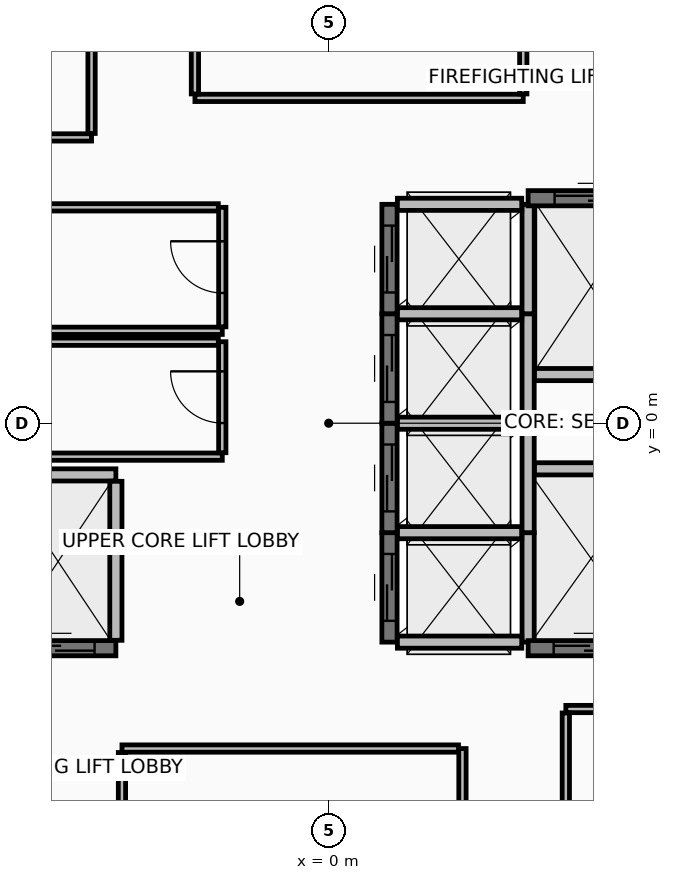
"""IFC4 building model, lengths in metres.
Left out: names, types, materials, properties, quantities, classifications, styles, units other than length and angle.
Written with IfcOpenShell. Run it as: python <this file> out.ifc"""

import sys

from ifc_helpers import new_model, si_unit, direction, frame, frame_2d, origin, place, context, subcontext, project, spatial, rectangle, extrude, element, fill, save


model = new_model("IFC4")
c1 = context("Model", 3, precision=1e-05, world=origin(), true_north=direction((0.0, 1.0)))
c2 = subcontext(c1, "Body", "Model", "MODEL_VIEW")
j1 = project(units=[si_unit("LENGTHUNIT", "METRE"), si_unit("PLANEANGLEUNIT", "RADIAN")], contexts=[c1])
p1 = place(None, origin())
s1 = spatial("IfcSite", under=j1, at=p1, CompositionType="ELEMENT")
p2 = place(p1, origin())
s2 = spatial("IfcBuilding", under=s1, at=p2, CompositionType="ELEMENT")
p3 = place(p2, frame((0.0, 0.0, 283.4)))
s3 = spatial("IfcBuildingStorey", under=s2, at=p3, CompositionType="ELEMENT", Elevation=283.4)
p4 = place(p3, frame((1.0, -3.6, 0.0), z_axis=(0.0, 0.0, 1.0), x_axis=(0.0, 1.0, 0.0)))
e1 = element("IfcWall", 1, at=p4, inside=s3, PredefinedType="SHEAR", context=c2, shape_type="SweptSolid", body=[
    extrude(rectangle(XDim=1.8, YDim=0.25, at=frame_2d((0.9, 0.0))), origin(), (0.0, 0.0, 1.0), 3.465),
])
p5 = place(p4, frame((0.35, 0.0, 0.0)))
e2 = element("IfcOpeningElement", 2, at=p5, cuts=e1, PredefinedType="OPENING", context=c2, shape_type="SweptSolid", body=[
    extrude(rectangle(XDim=1.1, YDim=2.2, at=frame_2d((0.55, 1.1))), frame((0.0, 0.135, 0.0), z_axis=(0.0, -1.0, 0.0), x_axis=(1.0, 0.0, 0.0)), (0.0, 0.0, 1.0), 0.27),
])
p6 = place(p3, frame((3.28, -3.6, 0.0), z_axis=(0.0, 0.0, 1.0), x_axis=(0.0, 1.0, 0.0)))
e3 = element("IfcWall", 3, at=p6, inside=s3, PredefinedType="PARTITIONING", context=c2, shape_type="SweptSolid", body=[
    extrude(rectangle(XDim=1.8, YDim=0.2, at=frame_2d((0.9, 0.0))), origin(), (0.0, 0.0, 1.0), 3.465),
])
for number, where, z_axis, x_axis in (
    (4, (1.13, -3.6, 0.0), (0.0, 0.0, 1.0), (1.0, 0.0, 0.0)),
    (5, (1.13, -1.8, 0.0), (0.0, 0.0, 1.0), (1.0, 0.0, 0.0)),
):
    element("IfcWall", number, at=place(p3, frame(where, z_axis=z_axis, x_axis=x_axis)), inside=s3, PredefinedType="PARTITIONING", context=c2, shape_type="SweptSolid", body=[
        extrude(rectangle(XDim=2.045, YDim=0.2, at=frame_2d((1.022, 0.0))), origin(), (0.0, 0.0, 1.0), 3.465),
    ])
p7 = place(p3, frame((1.0, -1.8, 0.0), z_axis=(0.0, 0.0, 1.0), x_axis=(0.0, 1.0, 0.0)))
e6 = element("IfcWall", 6, at=p7, inside=s3, PredefinedType="SHEAR", context=c2, shape_type="SweptSolid", body=[
    extrude(rectangle(XDim=1.8, YDim=0.25, at=frame_2d((0.9, 0.0))), origin(), (0.0, 0.0, 1.0), 3.465),
])
p8 = place(p7, frame((0.35, 0.0, 0.0)))
e7 = element("IfcOpeningElement", 7, at=p8, cuts=e6, PredefinedType="OPENING", context=c2, shape_type="SweptSolid", body=[
    extrude(rectangle(XDim=1.1, YDim=2.2, at=frame_2d((0.55, 1.1))), frame((0.0, 0.135, 0.0), z_axis=(0.0, -1.0, 0.0), x_axis=(1.0, 0.0, 0.0)), (0.0, 0.0, 1.0), 0.27),
])
p9 = place(p3, frame((3.28, -1.8, 0.0), z_axis=(0.0, 0.0, 1.0), x_axis=(0.0, 1.0, 0.0)))
e8 = element("IfcWall", 8, at=p9, inside=s3, PredefinedType="PARTITIONING", context=c2, shape_type="SweptSolid", body=[
    extrude(rectangle(XDim=1.8, YDim=0.2, at=frame_2d((0.9, 0.0))), origin(), (0.0, 0.0, 1.0), 3.465),
])
p10 = place(p3, frame((1.13, 0.0, 0.0), z_axis=(0.0, 0.0, 1.0), x_axis=(1.0, 0.0, 0.0)))
e9 = element("IfcWall", 9, at=p10, inside=s3, PredefinedType="PARTITIONING", context=c2, shape_type="SweptSolid", body=[
    extrude(rectangle(XDim=2.045, YDim=0.2, at=frame_2d((1.022, 0.0))), origin(), (0.0, 0.0, 1.0), 3.465),
])
p11 = place(p3, frame((1.0, 0.0, 0.0), z_axis=(0.0, 0.0, 1.0), x_axis=(0.0, 1.0, 0.0)))
e10 = element("IfcWall", 10, at=p11, inside=s3, PredefinedType="SHEAR", context=c2, shape_type="SweptSolid", body=[
    extrude(rectangle(XDim=1.8, YDim=0.25, at=frame_2d((0.9, 0.0))), origin(), (0.0, 0.0, 1.0), 3.465),
])
p12 = place(p11, frame((0.35, 0.0, 0.0)))
e11 = element("IfcOpeningElement", 11, at=p12, cuts=e10, PredefinedType="OPENING", context=c2, shape_type="SweptSolid", body=[
    extrude(rectangle(XDim=1.1, YDim=2.2, at=frame_2d((0.55, 1.1))), frame((0.0, 0.135, 0.0), z_axis=(0.0, -1.0, 0.0), x_axis=(1.0, 0.0, 0.0)), (0.0, 0.0, 1.0), 0.27),
])
p13 = place(p3, frame((3.28, 0.0, 0.0), z_axis=(0.0, 0.0, 1.0), x_axis=(0.0, 1.0, 0.0)))
e12 = element("IfcWall", 12, at=p13, inside=s3, PredefinedType="PARTITIONING", context=c2, shape_type="SweptSolid", body=[
    extrude(rectangle(XDim=1.8, YDim=0.2, at=frame_2d((0.9, 0.0))), origin(), (0.0, 0.0, 1.0), 3.465),
])
p14 = place(p3, frame((1.13, 1.8, 0.0), z_axis=(0.0, 0.0, 1.0), x_axis=(1.0, 0.0, 0.0)))
e13 = element("IfcWall", 13, at=p14, inside=s3, PredefinedType="PARTITIONING", context=c2, shape_type="SweptSolid", body=[
    extrude(rectangle(XDim=2.045, YDim=0.2, at=frame_2d((1.022, 0.0))), origin(), (0.0, 0.0, 1.0), 3.465),
])
p15 = place(p3, frame((1.0, 1.8, 0.0), z_axis=(0.0, 0.0, 1.0), x_axis=(0.0, 1.0, 0.0)))
e14 = element("IfcWall", 14, at=p15, inside=s3, PredefinedType="SHEAR", context=c2, shape_type="SweptSolid", body=[
    extrude(rectangle(XDim=1.8, YDim=0.25, at=frame_2d((0.9, 0.0))), origin(), (0.0, 0.0, 1.0), 3.465),
])
p16 = place(p15, frame((0.35, 0.0, 0.0)))
e15 = element("IfcOpeningElement", 15, at=p16, cuts=e14, PredefinedType="OPENING", context=c2, shape_type="SweptSolid", body=[
    extrude(rectangle(XDim=1.1, YDim=2.2, at=frame_2d((0.55, 1.1))), frame((0.0, 0.135, 0.0), z_axis=(0.0, -1.0, 0.0), x_axis=(1.0, 0.0, 0.0)), (0.0, 0.0, 1.0), 0.27),
])
p17 = place(p3, frame((3.28, 1.8, 0.0), z_axis=(0.0, 0.0, 1.0), x_axis=(0.0, 1.0, 0.0)))
e16 = element("IfcWall", 16, at=p17, inside=s3, PredefinedType="PARTITIONING", context=c2, shape_type="SweptSolid", body=[
    extrude(rectangle(XDim=1.8, YDim=0.2, at=frame_2d((0.9, 0.0))), origin(), (0.0, 0.0, 1.0), 3.465),
])
p18 = place(p3, frame((1.13, 3.6, 0.0), z_axis=(0.0, 0.0, 1.0), x_axis=(1.0, 0.0, 0.0)))
e17 = element("IfcWall", 17, at=p18, inside=s3, PredefinedType="PARTITIONING", context=c2, shape_type="SweptSolid", body=[
    extrude(rectangle(XDim=2.045, YDim=0.2, at=frame_2d((1.022, 0.0))), origin(), (0.0, 0.0, 1.0), 2.76),
])
p19 = place(p3, frame((-5.4, -3.7, 0.0), z_axis=(0.0, 0.0, 1.0), x_axis=(1.0, 0.0, 0.0)))
e18 = element("IfcWall", 18, at=p19, inside=s3, PredefinedType="SHEAR", context=c2, shape_type="SweptSolid", body=[
    extrude(rectangle(XDim=1.9, YDim=0.25, at=frame_2d((0.95, 0.0))), origin(), (0.0, 0.0, 1.0), 3.465),
])
p20 = place(p19, frame((0.35, 0.0, 0.0)))
e19 = element("IfcOpeningElement", 19, at=p20, cuts=e18, PredefinedType="OPENING", context=c2, shape_type="SweptSolid", body=[
    extrude(rectangle(XDim=1.2, YDim=2.2, at=frame_2d((0.6, 1.1))), frame((0.0, 0.135, 0.0), z_axis=(0.0, -1.0, 0.0), x_axis=(1.0, 0.0, 0.0)), (0.0, 0.0, 1.0), 0.27),
])
p21 = place(p3, frame((-5.27, -0.85, 0.0), z_axis=(0.0, 0.0, 1.0), x_axis=(1.0, 0.0, 0.0)))
e20 = element("IfcWall", 20, at=p21, inside=s3, PredefinedType="PARTITIONING", context=c2, shape_type="SweptSolid", body=[
    extrude(rectangle(XDim=1.77, YDim=0.2, at=frame_2d((0.885, 0.0))), origin(), (0.0, 0.0, 1.0), 3.465),
])
p22 = place(p3, frame((-3.5, -3.57, 0.0), z_axis=(0.0, 0.0, 1.0), x_axis=(0.0, 1.0, 0.0)))
e21 = element("IfcWall", 21, at=p22, inside=s3, PredefinedType="PARTITIONING", context=c2, shape_type="SweptSolid", body=[
    extrude(rectangle(XDim=2.615, YDim=0.2, at=frame_2d((1.308, 0.0))), origin(), (0.0, 0.0, 1.0), 3.465),
])
p23 = place(p3, frame((3.28, 3.7, 0.0), z_axis=(0.0, 0.0, 1.0), x_axis=(1.0, 0.0, 0.0)))
e22 = element("IfcWall", 22, at=p23, inside=s3, PredefinedType="SHEAR", context=c2, shape_type="SweptSolid", body=[
    extrude(rectangle(XDim=2.07, YDim=0.25, at=frame_2d((1.035, 0.0))), origin(), (0.0, 0.0, 1.0), 3.465),
])
p24 = place(p23, frame((0.435, 0.0, 0.0)))
e23 = element("IfcOpeningElement", 23, at=p24, cuts=e22, PredefinedType="OPENING", context=c2, shape_type="SweptSolid", body=[
    extrude(rectangle(XDim=1.2, YDim=2.2, at=frame_2d((0.6, 1.1))), frame((0.0, 0.135, 0.0), z_axis=(0.0, -1.0, 0.0), x_axis=(1.0, 0.0, 0.0)), (0.0, 0.0, 1.0), 0.27),
])
p25 = place(p3, frame((3.385, 0.8, 0.0), z_axis=(0.0, 0.0, 1.0), x_axis=(1.0, 0.0, 0.0)))
e24 = element("IfcWall", 24, at=p25, inside=s3, PredefinedType="PARTITIONING", context=c2, shape_type="SweptSolid", body=[
    extrude(rectangle(XDim=1.835, YDim=0.2, at=frame_2d((0.917, 0.0))), origin(), (0.0, 0.0, 1.0), 3.465),
])
p26 = place(p3, frame((3.28, -3.7, 0.0), z_axis=(0.0, 0.0, 1.0), x_axis=(1.0, 0.0, 0.0)))
e25 = element("IfcWall", 25, at=p26, inside=s3, PredefinedType="SHEAR", context=c2, shape_type="SweptSolid", body=[
    extrude(rectangle(XDim=1.94, YDim=0.25, at=frame_2d((0.97, 0.0))), origin(), (0.0, 0.0, 1.0), 3.465),
])
p27 = place(p26, frame((0.42, 0.0, 0.0)))
e26 = element("IfcOpeningElement", 26, at=p27, cuts=e25, PredefinedType="OPENING", context=c2, shape_type="SweptSolid", body=[
    extrude(rectangle(XDim=1.1, YDim=2.2, at=frame_2d((0.55, 1.1))), frame((0.0, 0.135, 0.0), z_axis=(0.0, -1.0, 0.0), x_axis=(1.0, 0.0, 0.0)), (0.0, 0.0, 1.0), 0.27),
])
p28 = place(p3, frame((3.385, -0.75, 0.0), z_axis=(0.0, 0.0, 1.0), x_axis=(1.0, 0.0, 0.0)))
e27 = element("IfcWall", 27, at=p28, inside=s3, PredefinedType="PARTITIONING", context=c2, shape_type="SweptSolid", body=[
    extrude(rectangle(XDim=1.835, YDim=0.2, at=frame_2d((0.917, 0.0))), origin(), (0.0, 0.0, 1.0), 3.465),
])
p29 = place(p3, frame((-5.22, 1.52, 0.0), z_axis=(0.0, 0.0, 1.0), x_axis=(1.0, 0.0, 0.0)))
e28 = element("IfcWall", 28, at=p29, inside=s3, PredefinedType="PARTITIONING", context=c2, shape_type="SweptSolid", body=[
    extrude(rectangle(XDim=3.47, YDim=0.12, at=frame_2d((1.735, 0.0))), origin(), (0.0, 0.0, 1.0), 3.465),
])
p30 = place(p3, frame((-1.75, 1.585, 0.0), z_axis=(0.0, 0.0, 1.0), x_axis=(0.0, 1.0, 0.0)))
e29 = element("IfcWall", 29, at=p30, inside=s3, PredefinedType="PARTITIONING", context=c2, shape_type="SweptSolid", body=[
    extrude(rectangle(XDim=1.965, YDim=0.12, at=frame_2d((0.982, 0.0))), origin(), (0.0, 0.0, 1.0), 3.465),
])
p31 = place(p30, frame((0.557, 0.0, 0.0)))
e30 = element("IfcOpeningElement", 30, at=p31, cuts=e29, PredefinedType="OPENING", context=c2, shape_type="SweptSolid", body=[
    extrude(rectangle(XDim=0.85, YDim=2.1, at=frame_2d((0.425, 1.05))), frame((0.0, 0.07, 0.0), z_axis=(0.0, -1.0, 0.0), x_axis=(1.0, 0.0, 0.0)), (0.0, 0.0, 1.0), 0.14),
])
p32 = place(p3, frame((-1.815, 3.55, 0.0), z_axis=(0.0, 0.0, 1.0), x_axis=(-1.0, 0.0, 0.0)))
e31 = element("IfcWall", 31, at=p32, inside=s3, PredefinedType="PARTITIONING", context=c2, shape_type="SweptSolid", body=[
    extrude(rectangle(XDim=3.405, YDim=0.12, at=frame_2d((1.703, 0.0))), origin(), (0.0, 0.0, 1.0), 3.465),
])
p33 = place(p3, frame((-5.22, -0.55, 0.0), z_axis=(0.0, 0.0, 1.0), x_axis=(1.0, 0.0, 0.0)))
e32 = element("IfcWall", 32, at=p33, inside=s3, PredefinedType="PARTITIONING", context=c2, shape_type="SweptSolid", body=[
    extrude(rectangle(XDim=3.47, YDim=0.12, at=frame_2d((1.735, 0.0))), origin(), (0.0, 0.0, 1.0), 3.465),
])
p34 = place(p3, frame((-1.75, -0.485, 0.0), z_axis=(0.0, 0.0, 1.0), x_axis=(0.0, 1.0, 0.0)))
e33 = element("IfcWall", 33, at=p34, inside=s3, PredefinedType="PARTITIONING", context=c2, shape_type="SweptSolid", body=[
    extrude(rectangle(XDim=1.825, YDim=0.12, at=frame_2d((0.913, 0.0))), origin(), (0.0, 0.0, 1.0), 3.465),
])
p35 = place(p34, frame((0.488, 0.0, 0.0)))
e34 = element("IfcOpeningElement", 34, at=p35, cuts=e33, PredefinedType="OPENING", context=c2, shape_type="SweptSolid", body=[
    extrude(rectangle(XDim=0.85, YDim=2.1, at=frame_2d((0.425, 1.05))), frame((0.0, 0.07, 0.0), z_axis=(0.0, -1.0, 0.0), x_axis=(1.0, 0.0, 0.0)), (0.0, 0.0, 1.0), 0.14),
])
p36 = place(p3, frame((-1.815, 1.34, 0.0), z_axis=(0.0, 0.0, 1.0), x_axis=(-1.0, 0.0, 0.0)))
e35 = element("IfcWall", 35, at=p36, inside=s3, PredefinedType="PARTITIONING", context=c2, shape_type="SweptSolid", body=[
    extrude(rectangle(XDim=3.405, YDim=0.12, at=frame_2d((1.703, 0.0))), origin(), (0.0, 0.0, 1.0), 3.465),
])
p37 = place(p3, frame((2.2, -7.42, 0.0), z_axis=(0.0, 0.0, 1.0), x_axis=(0.0, 1.0, 0.0)))
e36 = element("IfcWall", 36, at=p37, inside=s3, PredefinedType="PARTITIONING", context=c2, shape_type="SweptSolid", body=[
    extrude(rectangle(XDim=2.07, YDim=0.12, at=frame_2d((1.035, 0.0))), origin(), (0.0, 0.0, 1.0), 2.76),
])
p38 = place(p3, frame((2.135, -5.35, 0.0), z_axis=(0.0, 0.0, 1.0), x_axis=(-1.0, 0.0, 0.0)))
e37 = element("IfcWall", 37, at=p38, inside=s3, PredefinedType="PARTITIONING", context=c2, shape_type="SweptSolid", body=[
    extrude(rectangle(XDim=5.535, YDim=0.12, at=frame_2d((2.768, 0.0))), origin(), (0.0, 0.0, 1.0), 2.76),
])
p39 = place(p3, frame((-3.4, -5.415, 0.0), z_axis=(0.0, 0.0, 1.0), x_axis=(0.0, -1.0, 0.0)))
e38 = element("IfcWall", 38, at=p39, inside=s3, PredefinedType="PARTITIONING", context=c2, shape_type="SweptSolid", body=[
    extrude(rectangle(XDim=2.8, YDim=0.12, at=frame_2d((1.4, 0.0))), origin(), (0.0, 0.0, 1.0), 2.76),
])
p40 = place(p3, frame((-2.2, 5.35, 0.0), z_axis=(0.0, 0.0, 1.0), x_axis=(1.0, 0.0, 0.0)))
e39 = element("IfcWall", 39, at=p40, inside=s3, PredefinedType="PARTITIONING", context=c2, shape_type="SweptSolid", body=[
    extrude(rectangle(XDim=5.4, YDim=0.12, at=frame_2d((2.7, 0.0))), origin(), (0.0, 0.0, 1.0), 2.76),
])
p41 = place(p3, frame((3.2, 5.415, 0.0), z_axis=(0.0, 0.0, 1.0), x_axis=(0.0, 1.0, 0.0)))
e40 = element("IfcWall", 40, at=p41, inside=s3, PredefinedType="PARTITIONING", context=c2, shape_type="SweptSolid", body=[
    extrude(rectangle(XDim=2.8, YDim=0.12, at=frame_2d((1.4, 0.0))), origin(), (0.0, 0.0, 1.0), 2.76),
])
p42 = place(p3, frame((-2.2, 7.42, 0.0), z_axis=(0.0, 0.0, 1.0), x_axis=(0.0, -1.0, 0.0)))
e41 = element("IfcWall", 41, at=p42, inside=s3, PredefinedType="PARTITIONING", context=c2, shape_type="SweptSolid", body=[
    extrude(rectangle(XDim=2.005, YDim=0.12, at=frame_2d((1.002, 0.0))), origin(), (0.0, 0.0, 1.0), 2.76),
])
p43 = place(p3, frame((-5.35, 4.7, 0.0), z_axis=(0.0, 0.0, 1.0), x_axis=(1.0, 0.0, 0.0)))
e42 = element("IfcWall", 42, at=p43, inside=s3, PredefinedType="PARTITIONING", context=c2, shape_type="SweptSolid", body=[
    extrude(rectangle(XDim=1.45, YDim=0.12, at=frame_2d((0.725, 0.0))), origin(), (0.0, 0.0, 1.0), 3.465),
])
p44 = place(p3, frame((-3.9, 4.765, 0.0), z_axis=(0.0, 0.0, 1.0), x_axis=(0.0, 1.0, 0.0)))
e43 = element("IfcWall", 43, at=p44, inside=s3, PredefinedType="PARTITIONING", context=c2, shape_type="SweptSolid", body=[
    extrude(rectangle(XDim=3.45, YDim=0.12, at=frame_2d((1.725, 0.0))), origin(), (0.0, 0.0, 1.0), 2.76),
])
p45 = place(p3, frame((5.785, -4.7, 0.0), z_axis=(0.0, 0.0, 1.0), x_axis=(-1.0, 0.0, 0.0)))
e44 = element("IfcWall", 44, at=p45, inside=s3, PredefinedType="PARTITIONING", context=c2, shape_type="SweptSolid", body=[
    extrude(rectangle(XDim=1.885, YDim=0.12, at=frame_2d((0.942, 0.0))), origin(), (0.0, 0.0, 1.0), 3.465),
])
p46 = place(p3, frame((3.9, -4.765, 0.0), z_axis=(0.0, 0.0, 1.0), x_axis=(0.0, -1.0, 0.0)))
e45 = element("IfcWall", 45, at=p46, inside=s3, PredefinedType="PARTITIONING", context=c2, shape_type="SweptSolid", body=[
    extrude(rectangle(XDim=3.45, YDim=0.12, at=frame_2d((1.725, 0.0))), origin(), (0.0, 0.0, 1.0), 2.76),
])
p47 = place(p5, origin())
e46 = element("IfcDoor", 46, at=p47, inside=s3, OperationType="SLIDING_TO_LEFT", PredefinedType="DOOR", context=c2, shape_type="SweptSolid", body=[
    extrude(rectangle(XDim=1.1, YDim=2.2, at=frame_2d((0.55, 1.1))), frame((0.0, 0.025, 0.0), z_axis=(0.0, -1.0, 0.0), x_axis=(1.0, 0.0, 0.0)), (0.0, 0.0, 1.0), 0.05),
])
fill(e2, e46)
p48 = place(p8, origin())
e47 = element("IfcDoor", 47, at=p48, inside=s3, OperationType="SLIDING_TO_LEFT", PredefinedType="DOOR", context=c2, shape_type="SweptSolid", body=[
    extrude(rectangle(XDim=1.1, YDim=2.2, at=frame_2d((0.55, 1.1))), frame((0.0, 0.025, 0.0), z_axis=(0.0, -1.0, 0.0), x_axis=(1.0, 0.0, 0.0)), (0.0, 0.0, 1.0), 0.05),
])
fill(e7, e47)
p49 = place(p12, origin())
e48 = element("IfcDoor", 48, at=p49, inside=s3, OperationType="SLIDING_TO_LEFT", PredefinedType="DOOR", context=c2, shape_type="SweptSolid", body=[
    extrude(rectangle(XDim=1.1, YDim=2.2, at=frame_2d((0.55, 1.1))), frame((0.0, 0.025, 0.0), z_axis=(0.0, -1.0, 0.0), x_axis=(1.0, 0.0, 0.0)), (0.0, 0.0, 1.0), 0.05),
])
fill(e11, e48)
p50 = place(p16, origin())
e49 = element("IfcDoor", 49, at=p50, inside=s3, OperationType="SLIDING_TO_LEFT", PredefinedType="DOOR", context=c2, shape_type="SweptSolid", body=[
    extrude(rectangle(XDim=1.1, YDim=2.2, at=frame_2d((0.55, 1.1))), frame((0.0, 0.025, 0.0), z_axis=(0.0, -1.0, 0.0), x_axis=(1.0, 0.0, 0.0)), (0.0, 0.0, 1.0), 0.05),
])
fill(e15, e49)
p51 = place(p20, origin())
e50 = element("IfcDoor", 50, at=p51, inside=s3, OperationType="SLIDING_TO_RIGHT", PredefinedType="DOOR", context=c2, shape_type="SweptSolid", body=[
    extrude(rectangle(XDim=1.2, YDim=2.2, at=frame_2d((0.6, 1.1))), frame((0.0, 0.025, 0.0), z_axis=(0.0, -1.0, 0.0), x_axis=(1.0, 0.0, 0.0)), (0.0, 0.0, 1.0), 0.05),
])
fill(e19, e50)
p52 = place(p24, origin())
e51 = element("IfcDoor", 51, at=p52, inside=s3, OperationType="SLIDING_TO_RIGHT", PredefinedType="DOOR", context=c2, shape_type="SweptSolid", body=[
    extrude(rectangle(XDim=1.2, YDim=2.2, at=frame_2d((0.6, 1.1))), frame((0.0, 0.025, 0.0), z_axis=(0.0, -1.0, 0.0), x_axis=(1.0, 0.0, 0.0)), (0.0, 0.0, 1.0), 0.05),
])
fill(e23, e51)
p53 = place(p27, origin())
e52 = element("IfcDoor", 52, at=p53, inside=s3, OperationType="SLIDING_TO_LEFT", PredefinedType="DOOR", context=c2, shape_type="SweptSolid", body=[
    extrude(rectangle(XDim=1.1, YDim=2.2, at=frame_2d((0.55, 1.1))), frame((0.0, 0.025, 0.0), z_axis=(0.0, -1.0, 0.0), x_axis=(1.0, 0.0, 0.0)), (0.0, 0.0, 1.0), 0.05),
])
fill(e26, e52)
p54 = place(p31, frame((0.85, 0.0, 0.0), z_axis=(0.0, 0.0, 1.0), x_axis=(-1.0, 0.0, 0.0)))
e53 = element("IfcDoor", 53, at=p54, inside=s3, OperationType="SINGLE_SWING_RIGHT", PredefinedType="DOOR", context=c2, shape_type="SweptSolid", body=[
    extrude(rectangle(XDim=0.85, YDim=2.1, at=frame_2d((0.425, 1.05))), frame((0.0, 0.025, 0.0), z_axis=(0.0, -1.0, 0.0), x_axis=(1.0, 0.0, 0.0)), (0.0, 0.0, 1.0), 0.05),
])
fill(e30, e53)
p55 = place(p35, frame((0.85, 0.0, 0.0), z_axis=(0.0, 0.0, 1.0), x_axis=(-1.0, 0.0, 0.0)))
e54 = element("IfcDoor", 54, at=p55, inside=s3, OperationType="SINGLE_SWING_RIGHT", PredefinedType="DOOR", context=c2, shape_type="SweptSolid", body=[
    extrude(rectangle(XDim=0.85, YDim=2.1, at=frame_2d((0.425, 1.05))), frame((0.0, 0.025, 0.0), z_axis=(0.0, -1.0, 0.0), x_axis=(1.0, 0.0, 0.0)), (0.0, 0.0, 1.0), 0.05),
])
fill(e34, e54)
save(model, sys.argv[1])
